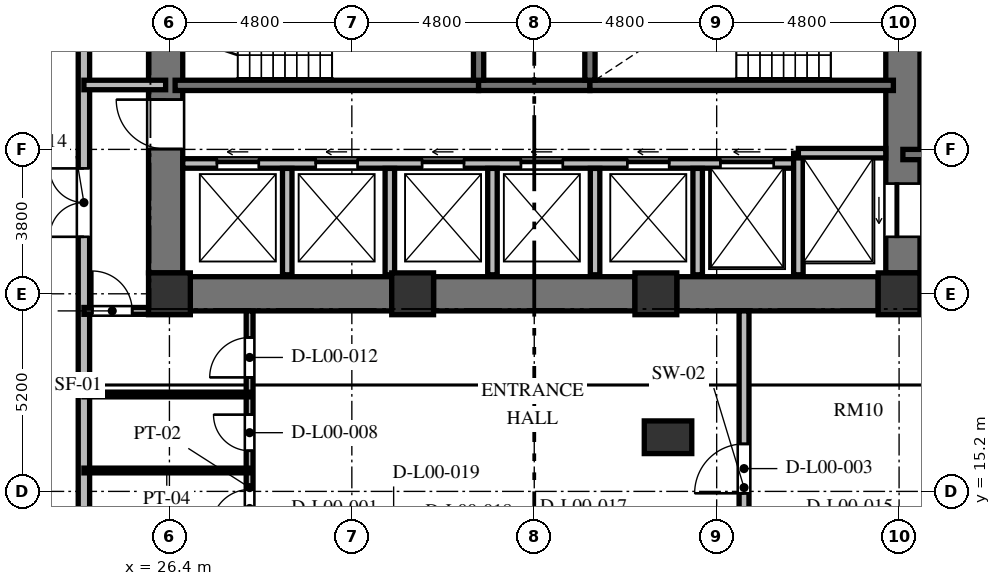
"""IFC4 building model, lengths in metres.
Left out: names, types, materials, properties, quantities, classifications, styles, units other than length and angle.
Written with IfcOpenShell. Run it as: python <this file> out.ifc"""

import sys

from ifc_helpers import new_model, si_unit, direction, frame, frame_2d, origin, origin_2d, place, context, subcontext, project, spatial, rectangle, extrude, element, fill, save


model = new_model("IFC4")
c1 = context("Model", 3, precision=1e-05, world=origin(), true_north=direction((0.0, 1.0)))
c2 = subcontext(c1, "Body", "Model", "MODEL_VIEW")
j1 = project(units=[si_unit("LENGTHUNIT", "METRE"), si_unit("PLANEANGLEUNIT", "RADIAN")], contexts=[c1])
p1 = place(None, origin())
s1 = spatial("IfcSite", under=j1, at=p1, CompositionType="ELEMENT")
p2 = place(p1, origin())
s2 = spatial("IfcBuilding", under=s1, at=p2, CompositionType="ELEMENT")
p3 = place(p2, origin())
s3 = spatial("IfcBuildingStorey", under=s2, at=p3, CompositionType="ELEMENT", Elevation=0.0)
for number, where, z_axis, x_axis in (
    (1, (26.4, 20.4, 0.0), (0.0, 0.0, 1.0), (1.0, 0.0, 0.0)),
    (2, (32.8, 20.4, 0.0), (0.0, 0.0, 1.0), (1.0, 0.0, 0.0)),
    (3, (39.2, 20.4, 0.0), (0.0, 0.0, 1.0), (1.0, 0.0, 0.0)),
    (4, (45.6, 20.4, 0.0), (0.0, 0.0, 1.0), (1.0, 0.0, 0.0)),
):
    element("IfcColumn", number, at=place(p3, frame(where, z_axis=z_axis, x_axis=x_axis)), inside=s3, PredefinedType="COLUMN", context=c2, shape_type="SweptSolid", body=[
        extrude(rectangle(XDim=1.1, YDim=1.1, at=origin_2d()), origin(), (0.0, 0.0, 1.0), 6.0),
    ])
p4 = place(p3, frame((39.52, 16.625, 0.0), z_axis=(0.0, 0.0, 1.0), x_axis=(1.0, 0.0, 0.0)))
e5 = element("IfcColumn", 5, at=p4, inside=s3, PredefinedType="COLUMN", context=c2, shape_type="SweptSolid", body=[
    extrude(rectangle(XDim=1.25, YDim=0.86, at=origin_2d()), origin(), (0.0, 0.0, 1.0), 6.0),
])
p5 = place(p3, frame((26.3, 20.95, 0.0), z_axis=(0.0, 0.0, 1.0), x_axis=(0.0, 1.0, 0.0)))
e6 = element("IfcWall", 6, at=p5, inside=s3, PredefinedType="SHEAR", context=c2, shape_type="SweptSolid", body=[
    extrude(rectangle(XDim=14.1, YDim=0.9, at=frame_2d((7.05, 0.0))), origin(), (0.0, 0.0, 1.0), 6.0),
])
p6 = place(p5, frame((6.5, 0.0, 0.0)))
e7 = element("IfcOpeningElement", 7, at=p6, cuts=e6, PredefinedType="OPENING", context=c2, shape_type="SweptSolid", body=[
    extrude(rectangle(XDim=1.2, YDim=2.15, at=frame_2d((0.6, 1.075))), frame((0.0, 0.46, 0.0), z_axis=(0.0, -1.0, 0.0), x_axis=(1.0, 0.0, 0.0)), (0.0, 0.0, 1.0), 0.92),
])
p7 = place(p5, frame((9.6, 0.0, 0.0)))
e8 = element("IfcOpeningElement", 8, at=p7, cuts=e6, PredefinedType="OPENING", context=c2, shape_type="SweptSolid", body=[
    extrude(rectangle(XDim=1.3, YDim=2.2, at=frame_2d((0.65, 1.1))), frame((0.0, 0.46, 0.0), z_axis=(0.0, -1.0, 0.0), x_axis=(1.0, 0.0, 0.0)), (0.0, 0.0, 1.0), 0.92),
])
p8 = place(p5, frame((3.26, 0.0, 0.0)))
e9 = element("IfcOpeningElement", 9, at=p8, cuts=e6, PredefinedType="OPENING", context=c2, shape_type="SweptSolid", body=[
    extrude(rectangle(XDim=1.3, YDim=2.2, at=frame_2d((0.65, 1.1))), frame((0.0, 0.46, 0.0), z_axis=(0.0, -1.0, 0.0), x_axis=(1.0, 0.0, 0.0)), (0.0, 0.0, 1.0), 0.92),
])
p9 = place(p3, frame((45.7, 20.95, 0.0), z_axis=(0.0, 0.0, 1.0), x_axis=(0.0, 1.0, 0.0)))
e10 = element("IfcWall", 10, at=p9, inside=s3, PredefinedType="SHEAR", context=c2, shape_type="SweptSolid", body=[
    extrude(rectangle(XDim=14.1, YDim=0.9, at=frame_2d((7.05, 0.0))), origin(), (0.0, 0.0, 1.0), 6.0),
])
p10 = place(p9, frame((11.75, 0.0, 0.0)))
e11 = element("IfcOpeningElement", 11, at=p10, cuts=e10, PredefinedType="OPENING", context=c2, shape_type="SweptSolid", body=[
    extrude(rectangle(XDim=1.4, YDim=2.3, at=frame_2d((0.7, 1.15))), frame((0.0, 0.46, 0.0), z_axis=(0.0, -1.0, 0.0), x_axis=(1.0, 0.0, 0.0)), (0.0, 0.0, 1.0), 0.92),
])
p11 = place(p9, frame((0.95, 0.0, 0.0)))
e12 = element("IfcOpeningElement", 12, at=p11, cuts=e10, PredefinedType="OPENING", context=c2, shape_type="SweptSolid", body=[
    extrude(rectangle(XDim=1.4, YDim=2.3, at=frame_2d((0.7, 1.15))), frame((0.0, 0.46, 0.0), z_axis=(0.0, -1.0, 0.0), x_axis=(1.0, 0.0, 0.0)), (0.0, 0.0, 1.0), 0.92),
])
p12 = place(p3, frame((26.95, 20.4, 0.0), z_axis=(0.0, 0.0, 1.0), x_axis=(1.0, 0.0, 0.0)))
e13 = element("IfcWall", 13, at=p12, inside=s3, PredefinedType="SHEAR", context=c2, shape_type="SweptSolid", body=[
    extrude(rectangle(XDim=5.3, YDim=0.9, at=frame_2d((2.65, 0.0))), origin(), (0.0, 0.0, 1.0), 6.0),
])
p13 = place(p3, frame((33.35, 20.4, 0.0), z_axis=(0.0, 0.0, 1.0), x_axis=(1.0, 0.0, 0.0)))
e14 = element("IfcWall", 14, at=p13, inside=s3, PredefinedType="SHEAR", context=c2, shape_type="SweptSolid", body=[
    extrude(rectangle(XDim=5.3, YDim=0.9, at=frame_2d((2.65, 0.0))), origin(), (0.0, 0.0, 1.0), 6.0),
])
p14 = place(p3, frame((39.75, 20.4, 0.0), z_axis=(0.0, 0.0, 1.0), x_axis=(1.0, 0.0, 0.0)))
e15 = element("IfcWall", 15, at=p14, inside=s3, PredefinedType="SHEAR", context=c2, shape_type="SweptSolid", body=[
    extrude(rectangle(XDim=5.3, YDim=0.9, at=frame_2d((2.65, 0.0))), origin(), (0.0, 0.0, 1.0), 6.0),
])
p15 = place(p3, frame((24.15, 13.75, 0.0), z_axis=(0.0, 0.0, 1.0), x_axis=(0.0, 1.0, 0.0)))
e16 = element("IfcWall", 16, at=p15, inside=s3, PredefinedType="SOLIDWALL", context=c2, shape_type="SweptSolid", body=[
    extrude(rectangle(XDim=22.48, YDim=0.3, at=frame_2d((11.24, 0.0))), origin(), (0.0, 0.0, 1.0), 5.72),
])
p16 = place(p15, frame((8.15, 0.0, 0.0)))
e17 = element("IfcOpeningElement", 17, at=p16, cuts=e16, PredefinedType="OPENING", context=c2, shape_type="SweptSolid", body=[
    extrude(rectangle(XDim=1.8, YDim=2.4, at=frame_2d((0.9, 1.2))), frame((0.0, 0.16, 0.0), z_axis=(0.0, -1.0, 0.0), x_axis=(1.0, 0.0, 0.0)), (0.0, 0.0, 1.0), 0.32),
])
p17 = place(p15, frame((13.4, 0.0, 0.0)))
e18 = element("IfcOpeningElement", 18, at=p17, cuts=e16, PredefinedType="OPENING", context=c2, shape_type="SweptSolid", body=[
    extrude(rectangle(XDim=1.8, YDim=2.4, at=frame_2d((0.9, 1.2))), frame((0.0, 0.16, 0.0), z_axis=(0.0, -1.0, 0.0), x_axis=(1.0, 0.0, 0.0)), (0.0, 0.0, 1.0), 0.32),
])
p18 = place(p15, frame((18.45, 0.0, 0.0)))
e19 = element("IfcOpeningElement", 19, at=p18, cuts=e16, PredefinedType="OPENING", context=c2, shape_type="SweptSolid", body=[
    extrude(rectangle(XDim=1.8, YDim=2.4, at=frame_2d((0.9, 1.2))), frame((0.0, 0.16, 0.0), z_axis=(0.0, -1.0, 0.0), x_axis=(1.0, 0.0, 0.0)), (0.0, 0.0, 1.0), 0.32),
])
p19 = place(p3, frame((26.55, 25.885, 0.0), z_axis=(0.0, 0.0, 1.0), x_axis=(1.0, 0.0, 0.0)))
e20 = element("IfcWall", 20, at=p19, inside=s3, PredefinedType="SHEAR", context=c2, shape_type="SweptSolid", body=[
    extrude(rectangle(XDim=7.985, YDim=0.27, at=frame_2d((3.992, 0.0))), origin(), (0.0, 0.0, 1.0), 6.0),
])
p20 = place(p3, frame((34.535, 25.885, 0.0), z_axis=(0.0, 0.0, 1.0), x_axis=(1.0, 0.0, 0.0)))
e21 = element("IfcWall", 21, at=p20, inside=s3, PredefinedType="SHEAR", context=c2, shape_type="SweptSolid", body=[
    extrude(rectangle(XDim=2.93, YDim=0.27, at=frame_2d((1.465, 0.0))), origin(), (0.0, 0.0, 1.0), 6.0),
])
p21 = place(p3, frame((37.465, 25.885, 0.0), z_axis=(0.0, 0.0, 1.0), x_axis=(1.0, 0.0, 0.0)))
e22 = element("IfcWall", 22, at=p21, inside=s3, PredefinedType="SHEAR", context=c2, shape_type="SweptSolid", body=[
    extrude(rectangle(XDim=7.985, YDim=0.27, at=frame_2d((3.992, 0.0))), origin(), (0.0, 0.0, 1.0), 6.0),
])
for number, where, z_axis, x_axis in (
    (23, (34.535, 26.02, 0.0), (0.0, 0.0, 1.0), (0.0, 1.0, 0.0)),
    (24, (37.465, 26.02, 0.0), (0.0, 0.0, 1.0), (0.0, 1.0, 0.0)),
):
    element("IfcWall", number, at=place(p3, frame(where, z_axis=z_axis, x_axis=x_axis)), inside=s3, PredefinedType="SHEAR", context=c2, shape_type="SweptSolid", body=[
        extrude(rectangle(XDim=4.08, YDim=0.27, at=frame_2d((2.04, 0.0))), origin(), (0.0, 0.0, 1.0), 6.0),
    ])
p22 = place(p3, frame((26.75, 23.83, 0.0), z_axis=(0.0, 0.0, 1.0), x_axis=(1.0, 0.0, 0.0)))
e25 = element("IfcWall", 25, at=p22, inside=s3, PredefinedType="SOLIDWALL", context=c2, shape_type="SweptSolid", body=[
    extrude(rectangle(XDim=16.2, YDim=0.25, at=frame_2d((8.1, 0.0))), origin(), (0.0, 0.0, 1.0), 5.72),
])
p23 = place(p22, frame((0.9, 0.0, 0.0)))
e26 = element("IfcOpeningElement", 26, at=p23, cuts=e25, PredefinedType="OPENING", context=c2, shape_type="SweptSolid", body=[
    extrude(rectangle(XDim=1.1, YDim=2.2, at=frame_2d((0.55, 1.1))), frame((0.0, 0.135, 0.0), z_axis=(0.0, -1.0, 0.0), x_axis=(1.0, 0.0, 0.0)), (0.0, 0.0, 1.0), 0.27),
])
p24 = place(p22, frame((3.5, 0.0, 0.0)))
e27 = element("IfcOpeningElement", 27, at=p24, cuts=e25, PredefinedType="OPENING", context=c2, shape_type="SweptSolid", body=[
    extrude(rectangle(XDim=1.1, YDim=2.2, at=frame_2d((0.55, 1.1))), frame((0.0, 0.135, 0.0), z_axis=(0.0, -1.0, 0.0), x_axis=(1.0, 0.0, 0.0)), (0.0, 0.0, 1.0), 0.27),
])
p25 = place(p22, frame((6.3, 0.0, 0.0)))
e28 = element("IfcOpeningElement", 28, at=p25, cuts=e25, PredefinedType="OPENING", context=c2, shape_type="SweptSolid", body=[
    extrude(rectangle(XDim=1.1, YDim=2.2, at=frame_2d((0.55, 1.1))), frame((0.0, 0.135, 0.0), z_axis=(0.0, -1.0, 0.0), x_axis=(1.0, 0.0, 0.0)), (0.0, 0.0, 1.0), 0.27),
])
p26 = place(p22, frame((8.9, 0.0, 0.0)))
e29 = element("IfcOpeningElement", 29, at=p26, cuts=e25, PredefinedType="OPENING", context=c2, shape_type="SweptSolid", body=[
    extrude(rectangle(XDim=1.1, YDim=2.2, at=frame_2d((0.55, 1.1))), frame((0.0, 0.135, 0.0), z_axis=(0.0, -1.0, 0.0), x_axis=(1.0, 0.0, 0.0)), (0.0, 0.0, 1.0), 0.27),
])
p27 = place(p22, frame((11.7, 0.0, 0.0)))
e30 = element("IfcOpeningElement", 30, at=p27, cuts=e25, PredefinedType="OPENING", context=c2, shape_type="SweptSolid", body=[
    extrude(rectangle(XDim=1.1, YDim=2.2, at=frame_2d((0.55, 1.1))), frame((0.0, 0.135, 0.0), z_axis=(0.0, -1.0, 0.0), x_axis=(1.0, 0.0, 0.0)), (0.0, 0.0, 1.0), 0.27),
])
p28 = place(p22, frame((14.15, 0.0, 0.0)))
e31 = element("IfcOpeningElement", 31, at=p28, cuts=e25, PredefinedType="OPENING", context=c2, shape_type="SweptSolid", body=[
    extrude(rectangle(XDim=1.4, YDim=2.3, at=frame_2d((0.7, 1.15))), frame((0.0, 0.135, 0.0), z_axis=(0.0, -1.0, 0.0), x_axis=(1.0, 0.0, 0.0)), (0.0, 0.0, 1.0), 0.27),
])
p29 = place(p3, frame((42.95, 20.9, 0.0), z_axis=(0.0, 0.0, 1.0), x_axis=(0.0, 1.0, 0.0)))
e32 = element("IfcWall", 32, at=p29, inside=s3, PredefinedType="SOLIDWALL", context=c2, shape_type="SweptSolid", body=[
    extrude(rectangle(XDim=3.2, YDim=0.25, at=frame_2d((1.6, 0.0))), origin(), (0.0, 0.0, 1.0), 5.72),
])
p30 = place(p3, frame((42.95, 24.1, 0.0), z_axis=(0.0, 0.0, 1.0), x_axis=(1.0, 0.0, 0.0)))
e33 = element("IfcWall", 33, at=p30, inside=s3, PredefinedType="SOLIDWALL", context=c2, shape_type="SweptSolid", body=[
    extrude(rectangle(XDim=2.3, YDim=0.25, at=frame_2d((1.15, 0.0))), origin(), (0.0, 0.0, 1.0), 5.72),
])
for number, where, z_axis, x_axis in (
    (34, (29.5, 20.9, 0.0), (0.0, 0.0, 1.0), (0.0, 1.0, 0.0)),
    (35, (32.2, 20.9, 0.0), (0.0, 0.0, 1.0), (0.0, 1.0, 0.0)),
    (36, (34.9, 20.9, 0.0), (0.0, 0.0, 1.0), (0.0, 1.0, 0.0)),
    (37, (37.6, 20.9, 0.0), (0.0, 0.0, 1.0), (0.0, 1.0, 0.0)),
    (38, (40.3, 20.9, 0.0), (0.0, 0.0, 1.0), (0.0, 1.0, 0.0)),
):
    element("IfcWall", number, at=place(p3, frame(where, z_axis=z_axis, x_axis=x_axis)), inside=s3, PredefinedType="SOLIDWALL", context=c2, shape_type="SweptSolid", body=[
        extrude(rectangle(XDim=2.8, YDim=0.25, at=frame_2d((1.4, 0.0))), origin(), (0.0, 0.0, 1.0), 5.72),
    ])
p31 = place(p3, frame((45.7, 24.065, 0.0), z_axis=(0.0, 0.0, 1.0), x_axis=(1.0, 0.0, 0.0)))
e39 = element("IfcWall", 39, at=p31, inside=s3, PredefinedType="SHEAR", context=c2, shape_type="SweptSolid", body=[
    extrude(rectangle(XDim=4.715, YDim=0.27, at=frame_2d((2.357, 0.0))), origin(), (0.0, 0.0, 1.0), 6.0),
])
p32 = place(p3, frame((45.7, 20.02, 0.0), z_axis=(0.0, 0.0, 1.0), x_axis=(1.0, 0.0, 0.0)))
e40 = element("IfcWall", 40, at=p32, inside=s3, PredefinedType="SOLIDWALL", context=c2, shape_type="SweptSolid", body=[
    extrude(rectangle(XDim=4.715, YDim=0.25, at=frame_2d((2.357, 0.0))), origin(), (0.0, 0.0, 1.0), 5.72),
])
p33 = place(p3, frame((24.15, 25.895, 0.0), z_axis=(0.0, 0.0, 1.0), x_axis=(1.0, 0.0, 0.0)))
e41 = element("IfcWall", 41, at=p33, inside=s3, PredefinedType="SOLIDWALL", context=c2, shape_type="SweptSolid", body=[
    extrude(rectangle(XDim=2.15, YDim=0.25, at=frame_2d((1.075, 0.0))), origin(), (0.0, 0.0, 1.0), 5.72),
])
p34 = place(p3, frame((41.52, 13.75, 0.0), z_axis=(0.0, 0.0, 1.0), x_axis=(0.0, 1.0, 0.0)))
e42 = element("IfcWall", 42, at=p34, inside=s3, PredefinedType="SOLIDWALL", context=c2, shape_type="SweptSolid", body=[
    extrude(rectangle(XDim=6.2, YDim=0.26, at=frame_2d((3.1, 0.0))), origin(), (0.0, 0.0, 1.0), 5.72),
])
p35 = place(p34, frame((1.4, 0.0, 0.0)))
e43 = element("IfcOpeningElement", 43, at=p35, cuts=e42, PredefinedType="OPENING", context=c2, shape_type="SweptSolid", body=[
    extrude(rectangle(XDim=1.3, YDim=2.2, at=frame_2d((0.65, 1.1))), frame((0.0, 0.14, 0.0), z_axis=(0.0, -1.0, 0.0), x_axis=(1.0, 0.0, 0.0)), (0.0, 0.0, 1.0), 0.28),
])
p36 = place(p3, frame((28.51, 13.75, 0.0), z_axis=(0.0, 0.0, 1.0), x_axis=(0.0, 1.0, 0.0)))
e44 = element("IfcWall", 44, at=p36, inside=s3, PredefinedType="PARTITIONING", context=c2, shape_type="SweptSolid", body=[
    extrude(rectangle(XDim=6.2, YDim=0.18, at=frame_2d((3.1, 0.0))), origin(), (0.0, 0.0, 1.0), 5.72),
])
p37 = place(p36, frame((0.5, 0.0, 0.0)))
e45 = element("IfcOpeningElement", 45, at=p37, cuts=e44, PredefinedType="OPENING", context=c2, shape_type="SweptSolid", body=[
    extrude(rectangle(XDim=1.0, YDim=2.1, at=frame_2d((0.5, 1.05))), frame((0.0, 0.1, 0.0), z_axis=(0.0, -1.0, 0.0), x_axis=(1.0, 0.0, 0.0)), (0.0, 0.0, 1.0), 0.2),
])
p38 = place(p36, frame((2.52, 0.0, 0.0)))
e46 = element("IfcOpeningElement", 46, at=p38, cuts=e44, PredefinedType="OPENING", context=c2, shape_type="SweptSolid", body=[
    extrude(rectangle(XDim=0.95, YDim=2.1, at=frame_2d((0.475, 1.05))), frame((0.0, 0.1, 0.0), z_axis=(0.0, -1.0, 0.0), x_axis=(1.0, 0.0, 0.0)), (0.0, 0.0, 1.0), 0.2),
])
p39 = place(p36, frame((4.45, 0.0, 0.0)))
e47 = element("IfcOpeningElement", 47, at=p39, cuts=e44, PredefinedType="OPENING", context=c2, shape_type="SweptSolid", body=[
    extrude(rectangle(XDim=1.05, YDim=2.15, at=frame_2d((0.525, 1.075))), frame((0.0, 0.1, 0.0), z_axis=(0.0, -1.0, 0.0), x_axis=(1.0, 0.0, 0.0)), (0.0, 0.0, 1.0), 0.2),
])
p40 = place(p3, frame((24.15, 19.95, 0.0), z_axis=(0.0, 0.0, 1.0), x_axis=(1.0, 0.0, 0.0)))
e48 = element("IfcWall", 48, at=p40, inside=s3, PredefinedType="PARTITIONING", context=c2, shape_type="SweptSolid", body=[
    extrude(rectangle(XDim=1.7, YDim=0.18, at=frame_2d((0.85, 0.0))), origin(), (0.0, 0.0, 1.0), 5.72),
])
p41 = place(p40, frame((0.22, 0.0, 0.0)))
e49 = element("IfcOpeningElement", 49, at=p41, cuts=e48, PredefinedType="OPENING", context=c2, shape_type="SweptSolid", body=[
    extrude(rectangle(XDim=1.05, YDim=2.15, at=frame_2d((0.525, 1.075))), frame((0.0, 0.1, 0.0), z_axis=(0.0, -1.0, 0.0), x_axis=(1.0, 0.0, 0.0)), (0.0, 0.0, 1.0), 0.2),
])
for number, where, z_axis, x_axis in (
    (50, (24.15, 15.75, 0.0), (0.0, 0.0, 1.0), (1.0, 0.0, 0.0)),
    (51, (24.15, 17.75, 0.0), (0.0, 0.0, 1.0), (1.0, 0.0, 0.0)),
):
    element("IfcWall", number, at=place(p3, frame(where, z_axis=z_axis, x_axis=x_axis)), inside=s3, PredefinedType="PARTITIONING", context=c2, shape_type="SweptSolid", body=[
        extrude(rectangle(XDim=4.36, YDim=0.125, at=frame_2d((2.18, 0.0))), origin(), (0.0, 0.0, 1.0), 5.72),
    ])
p42 = place(p16, origin())
e52 = element("IfcDoor", 52, at=p42, inside=s3, OperationType="DOUBLE_DOOR_SINGLE_SWING", PredefinedType="DOOR", context=c2, shape_type="SweptSolid", body=[
    extrude(rectangle(XDim=1.8, YDim=2.4, at=frame_2d((0.9, 1.2))), frame((0.0, 0.025, 0.0), z_axis=(0.0, -1.0, 0.0), x_axis=(1.0, 0.0, 0.0)), (0.0, 0.0, 1.0), 0.05),
])
fill(e17, e52)
p43 = place(p8, origin())
e53 = element("IfcDoor", 53, at=p43, inside=s3, OperationType="SINGLE_SWING_RIGHT", PredefinedType="DOOR", context=c2, shape_type="SweptSolid", body=[
    extrude(rectangle(XDim=1.3, YDim=2.2, at=frame_2d((0.65, 1.1))), frame((0.0, 0.025, 0.0), z_axis=(0.0, -1.0, 0.0), x_axis=(1.0, 0.0, 0.0)), (0.0, 0.0, 1.0), 0.05),
])
fill(e9, e53)
p44 = place(p23, origin())
e54 = element("IfcDoor", 54, at=p44, inside=s3, OperationType="SLIDING_TO_LEFT", PredefinedType="DOOR", context=c2, shape_type="SweptSolid", body=[
    extrude(rectangle(XDim=1.1, YDim=2.2, at=frame_2d((0.55, 1.1))), frame((0.0, 0.025, 0.0), z_axis=(0.0, -1.0, 0.0), x_axis=(1.0, 0.0, 0.0)), (0.0, 0.0, 1.0), 0.05),
])
fill(e26, e54)
p45 = place(p24, origin())
e55 = element("IfcDoor", 55, at=p45, inside=s3, OperationType="SLIDING_TO_LEFT", PredefinedType="DOOR", context=c2, shape_type="SweptSolid", body=[
    extrude(rectangle(XDim=1.1, YDim=2.2, at=frame_2d((0.55, 1.1))), frame((0.0, 0.025, 0.0), z_axis=(0.0, -1.0, 0.0), x_axis=(1.0, 0.0, 0.0)), (0.0, 0.0, 1.0), 0.05),
])
fill(e27, e55)
p46 = place(p25, origin())
e56 = element("IfcDoor", 56, at=p46, inside=s3, OperationType="SLIDING_TO_LEFT", PredefinedType="DOOR", context=c2, shape_type="SweptSolid", body=[
    extrude(rectangle(XDim=1.1, YDim=2.2, at=frame_2d((0.55, 1.1))), frame((0.0, 0.025, 0.0), z_axis=(0.0, -1.0, 0.0), x_axis=(1.0, 0.0, 0.0)), (0.0, 0.0, 1.0), 0.05),
])
fill(e28, e56)
p47 = place(p26, origin())
e57 = element("IfcDoor", 57, at=p47, inside=s3, OperationType="SLIDING_TO_LEFT", PredefinedType="DOOR", context=c2, shape_type="SweptSolid", body=[
    extrude(rectangle(XDim=1.1, YDim=2.2, at=frame_2d((0.55, 1.1))), frame((0.0, 0.025, 0.0), z_axis=(0.0, -1.0, 0.0), x_axis=(1.0, 0.0, 0.0)), (0.0, 0.0, 1.0), 0.05),
])
fill(e29, e57)
p48 = place(p27, origin())
e58 = element("IfcDoor", 58, at=p48, inside=s3, OperationType="SLIDING_TO_LEFT", PredefinedType="DOOR", context=c2, shape_type="SweptSolid", body=[
    extrude(rectangle(XDim=1.1, YDim=2.2, at=frame_2d((0.55, 1.1))), frame((0.0, 0.025, 0.0), z_axis=(0.0, -1.0, 0.0), x_axis=(1.0, 0.0, 0.0)), (0.0, 0.0, 1.0), 0.05),
])
fill(e30, e58)
p49 = place(p11, origin())
e59 = element("IfcDoor", 59, at=p49, inside=s3, OperationType="SLIDING_TO_LEFT", PredefinedType="DOOR", context=c2, shape_type="SweptSolid", body=[
    extrude(rectangle(XDim=1.4, YDim=2.3, at=frame_2d((0.7, 1.15))), frame((0.0, 0.025, 0.0), z_axis=(0.0, -1.0, 0.0), x_axis=(1.0, 0.0, 0.0)), (0.0, 0.0, 1.0), 0.05),
])
fill(e12, e59)
p50 = place(p28, origin())
e60 = element("IfcDoor", 60, at=p50, inside=s3, OperationType="SLIDING_TO_LEFT", PredefinedType="DOOR", context=c2, shape_type="SweptSolid", body=[
    extrude(rectangle(XDim=1.4, YDim=2.3, at=frame_2d((0.7, 1.15))), frame((0.0, 0.025, 0.0), z_axis=(0.0, -1.0, 0.0), x_axis=(1.0, 0.0, 0.0)), (0.0, 0.0, 1.0), 0.05),
])
fill(e31, e60)
p51 = place(p35, origin())
e61 = element("IfcDoor", 61, at=p51, inside=s3, OperationType="SINGLE_SWING_LEFT", PredefinedType="DOOR", context=c2, shape_type="SweptSolid", body=[
    extrude(rectangle(XDim=1.3, YDim=2.2, at=frame_2d((0.65, 1.1))), frame((0.0, 0.025, 0.0), z_axis=(0.0, -1.0, 0.0), x_axis=(1.0, 0.0, 0.0)), (0.0, 0.0, 1.0), 0.05),
])
fill(e43, e61)
p52 = place(p37, origin())
e62 = element("IfcDoor", 62, at=p52, inside=s3, OperationType="SINGLE_SWING_LEFT", PredefinedType="DOOR", context=c2, shape_type="SweptSolid", body=[
    extrude(rectangle(XDim=1.0, YDim=2.1, at=frame_2d((0.5, 1.05))), frame((0.0, 0.025, 0.0), z_axis=(0.0, -1.0, 0.0), x_axis=(1.0, 0.0, 0.0)), (0.0, 0.0, 1.0), 0.05),
])
fill(e45, e62)
p53 = place(p38, origin())
e63 = element("IfcDoor", 63, at=p53, inside=s3, OperationType="SINGLE_SWING_RIGHT", PredefinedType="DOOR", context=c2, shape_type="SweptSolid", body=[
    extrude(rectangle(XDim=0.95, YDim=2.1, at=frame_2d((0.475, 1.05))), frame((0.0, 0.025, 0.0), z_axis=(0.0, -1.0, 0.0), x_axis=(1.0, 0.0, 0.0)), (0.0, 0.0, 1.0), 0.05),
])
fill(e46, e63)
p54 = place(p39, origin())
e64 = element("IfcDoor", 64, at=p54, inside=s3, OperationType="SINGLE_SWING_LEFT", PredefinedType="DOOR", context=c2, shape_type="SweptSolid", body=[
    extrude(rectangle(XDim=1.05, YDim=2.15, at=frame_2d((0.525, 1.075))), frame((0.0, 0.025, 0.0), z_axis=(0.0, -1.0, 0.0), x_axis=(1.0, 0.0, 0.0)), (0.0, 0.0, 1.0), 0.05),
])
fill(e47, e64)
p55 = place(p41, origin())
e65 = element("IfcDoor", 65, at=p55, inside=s3, OperationType="SINGLE_SWING_LEFT", PredefinedType="DOOR", context=c2, shape_type="SweptSolid", body=[
    extrude(rectangle(XDim=1.05, YDim=2.15, at=frame_2d((0.525, 1.075))), frame((0.0, 0.025, 0.0), z_axis=(0.0, -1.0, 0.0), x_axis=(1.0, 0.0, 0.0)), (0.0, 0.0, 1.0), 0.05),
])
fill(e49, e65)
save(model, sys.argv[1])
